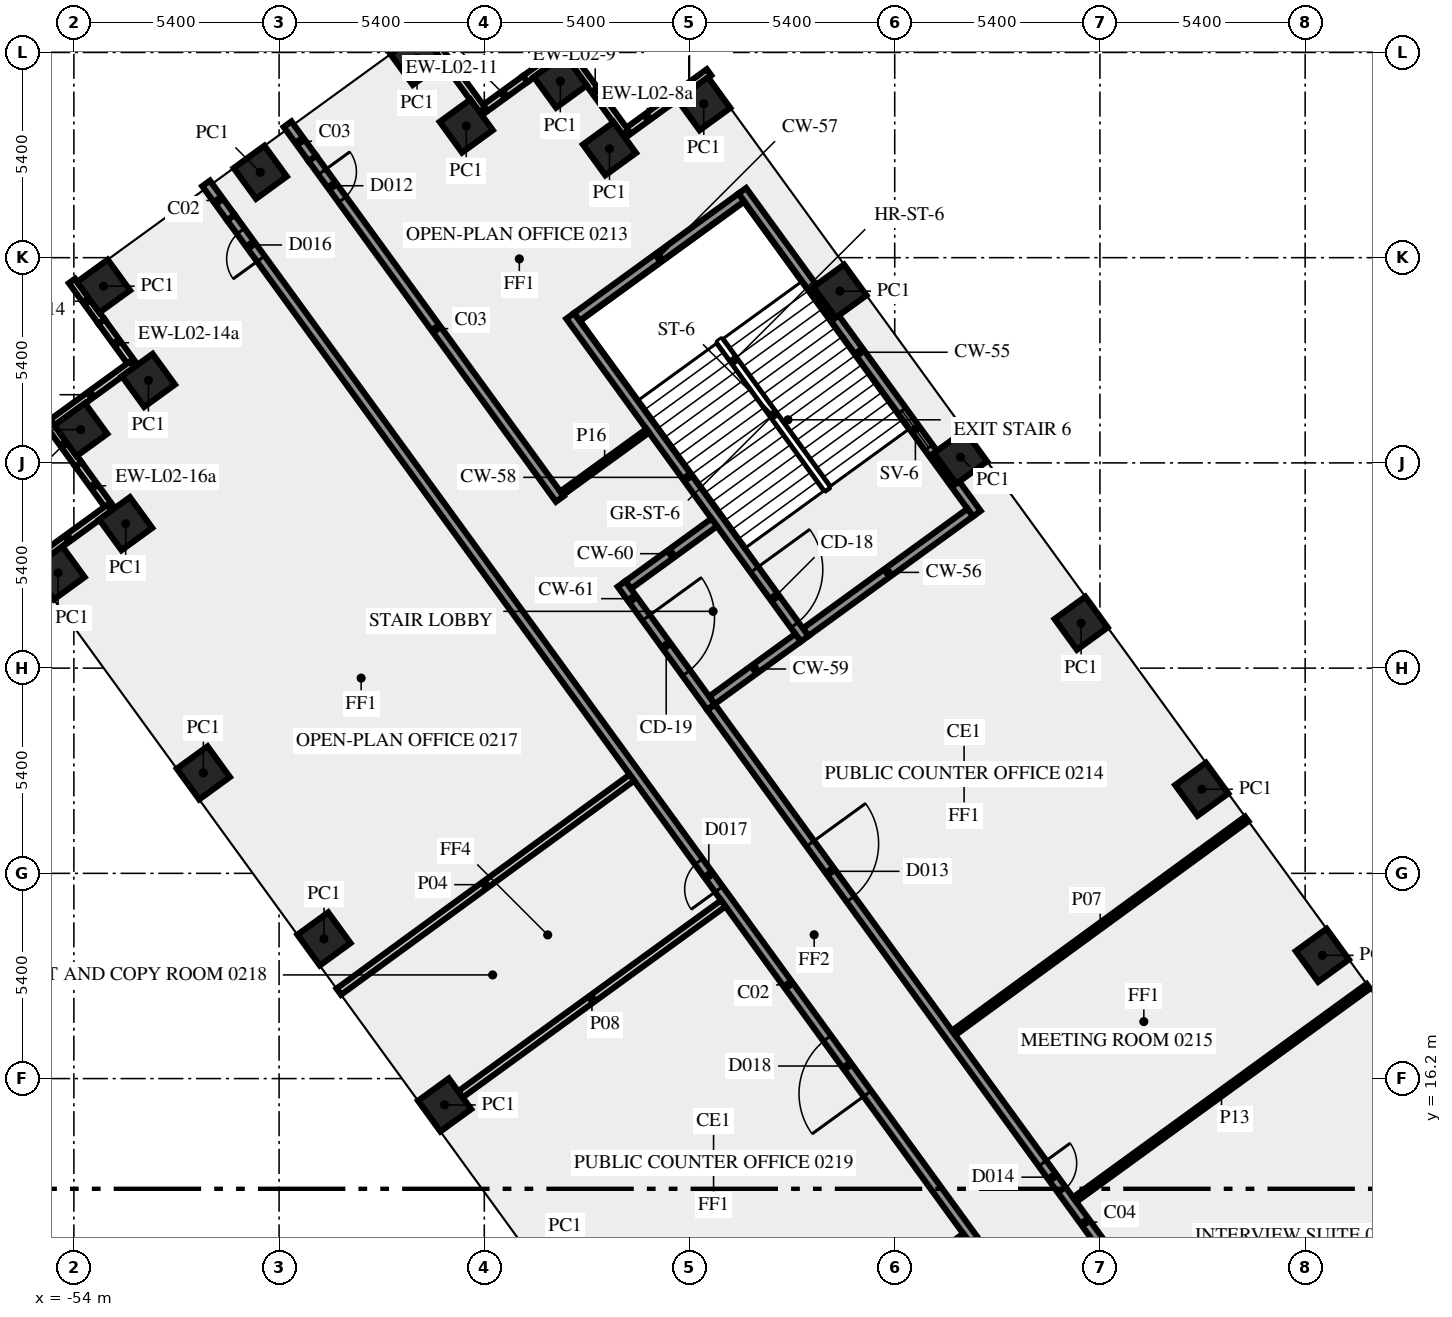
"""IFC4 building model, lengths in metres.
Left out: names, types, materials, properties, quantities, classifications, styles, units other than length and angle.
Written with IfcOpenShell. Run it as: python <this file> out.ifc"""

import sys

from ifc_helpers import new_model, si_unit, direction, frame, frame_2d, origin, origin_2d, place, context, subcontext, project, spatial, rectangle, extrude, element, fill, save


model = new_model("IFC4")
c1 = context("Model", 3, precision=1e-05, world=origin(), true_north=direction((0.0, 1.0)))
c2 = subcontext(c1, "Body", "Model", "MODEL_VIEW")
j1 = project(units=[si_unit("LENGTHUNIT", "METRE"), si_unit("PLANEANGLEUNIT", "RADIAN")], contexts=[c1])
p1 = place(None, origin())
s1 = spatial("IfcSite", under=j1, at=p1, CompositionType="ELEMENT")
p2 = place(p1, origin())
s2 = spatial("IfcBuilding", under=s1, at=p2, CompositionType="ELEMENT")
p3 = place(p2, frame((0.0, 0.0, 11.5)))
s3 = spatial("IfcBuildingStorey", under=s2, at=p3, CompositionType="ELEMENT", Elevation=11.5)
for number, where, z_axis, x_axis in (
    (1, (-21.147, 19.444, 0.0), (0.0, 0.0, 1.0), (-0.588, 0.809, 0.0)),
    (2, (-24.321, 23.812, 0.0), (0.0, 0.0, 1.0), (-0.588, 0.809, 0.0)),
    (3, (-27.495, 28.181, 0.0), (0.0, 0.0, 1.0), (-0.588, 0.809, 0.0)),
    (4, (-30.669, 32.55, 0.0), (0.0, 0.0, 1.0), (-0.588, 0.809, 0.0)),
    (5, (-33.843, 36.919, 0.0), (0.0, 0.0, 1.0), (-0.588, 0.809, 0.0)),
    (6, (-37.425, 41.85, 0.0), (0.0, 0.0, 1.0), (-0.588, 0.809, 0.0)),
    (7, (-39.906, 40.666, 0.0), (0.0, 0.0, 1.0), (-0.588, 0.809, 0.0)),
    (8, (-41.2, 42.445, 0.0), (0.0, 0.0, 1.0), (-0.588, 0.809, 0.0)),
    (9, (-43.675, 41.265, 0.0), (0.0, 0.0, 1.0), (-0.809, -0.588, 0.0)),
    (10, (-44.97, 43.045, 0.0), (0.0, 0.0, 1.0), (-0.809, -0.588, 0.0)),
    (11, (-49.096, 40.047, 0.0), (0.0, 0.0, 1.0), (-0.809, -0.588, 0.0)),
    (12, (-53.22, 37.05, 0.0), (0.0, 0.0, 1.0), (0.588, -0.809, 0.0)),
    (13, (-52.039, 34.571, 0.0), (0.0, 0.0, 1.0), (-0.809, -0.588, 0.0)),
    (14, (-53.82, 33.275, 0.0), (0.0, 0.0, 1.0), (0.588, -0.809, 0.0)),
    (15, (-52.636, 30.8, 0.0), (0.0, 0.0, 1.0), (-0.809, -0.588, 0.0)),
    (16, (-54.415, 29.505, 0.0), (0.0, 0.0, 1.0), (0.588, -0.809, 0.0)),
    (17, (-50.592, 24.243, 0.0), (0.0, 0.0, 1.0), (0.588, -0.809, 0.0)),
    (18, (-47.418, 19.875, 0.0), (0.0, 0.0, 1.0), (0.588, -0.809, 0.0)),
    (19, (-44.244, 15.506, 0.0), (0.0, 0.0, 1.0), (0.588, -0.809, 0.0)),
):
    element("IfcColumn", number, at=place(p3, frame(where, z_axis=z_axis, x_axis=x_axis)), inside=s3, PredefinedType="COLUMN", context=c2, shape_type="SweptSolid", body=[
        extrude(rectangle(XDim=1.0, YDim=1.0, at=origin_2d()), origin(), (0.0, 0.0, 1.0), 4.1),
    ])
p4 = place(p3, frame((-37.287, 42.678, 0.0), z_axis=(0.0, 0.0, 1.0), x_axis=(-0.809065186597, -0.587718915671, 0.0)))
e20 = element("IfcWall", 20, at=p4, inside=s3, PredefinedType="SOLIDWALL", context=c2, shape_type="SweptSolid", body=[
    extrude(rectangle(XDim=1.315, YDim=0.2, at=frame_2d((0.657, 0.0))), origin(), (0.0, 0.0, 1.0), 4.1),
])
p5 = place(p3, frame((-38.351, 41.905, 0.0), z_axis=(0.0, 0.0, 1.0), x_axis=(-0.809002762913, -0.58780483972, 0.0)))
e21 = element("IfcWall", 21, at=p5, inside=s3, PredefinedType="SOLIDWALL", context=c2, shape_type="SweptSolid", body=[
    extrude(rectangle(XDim=1.385, YDim=0.2, at=frame_2d((0.693, 0.0))), origin(), (0.0, 0.0, 1.0), 3.1),
])
p6 = place(p3, frame((-39.488, 41.094, 0.0), z_axis=(0.0, 0.0, 1.0), x_axis=(-0.587806000234, 0.809001919707, 0.0)))
e22 = element("IfcWall", 22, at=p6, inside=s3, PredefinedType="SOLIDWALL", context=c2, shape_type="SweptSolid", body=[
    extrude(rectangle(XDim=2.7, YDim=0.2, at=frame_2d((1.35, 0.0))), origin(), (0.0, 0.0, 1.0), 4.1),
])
p7 = place(p3, frame((-41.058, 43.275, 0.0), z_axis=(0.0, 0.0, 1.0), x_axis=(-0.809056865039, -0.587730371117, 0.0)))
e23 = element("IfcWall", 23, at=p7, inside=s3, PredefinedType="SOLIDWALL", context=c2, shape_type="SweptSolid", body=[
    extrude(rectangle(XDim=1.316, YDim=0.2, at=frame_2d((0.658, 0.0))), origin(), (0.0, 0.0, 1.0), 4.1),
])
p8 = place(p3, frame((-42.123, 42.502, 0.0), z_axis=(0.0, 0.0, 1.0), x_axis=(-0.808926734208, -0.5879094647, 0.0)))
e24 = element("IfcWall", 24, at=p8, inside=s3, PredefinedType="SOLIDWALL", context=c2, shape_type="SweptSolid", body=[
    extrude(rectangle(XDim=1.384, YDim=0.2, at=frame_2d((0.692, 0.0))), origin(), (0.0, 0.0, 1.0), 3.1),
])
p9 = place(p3, frame((-43.259, 41.691, 0.0), z_axis=(0.0, 0.0, 1.0), x_axis=(-0.587822180636, 0.808990163075, 0.0)))
e25 = element("IfcWall", 25, at=p9, inside=s3, PredefinedType="SOLIDWALL", context=c2, shape_type="SweptSolid", body=[
    extrude(rectangle(XDim=2.7, YDim=0.2, at=frame_2d((1.35, 0.0))), origin(), (0.0, 0.0, 1.0), 4.1),
])
p10 = place(p3, frame((-54.05, 37.188, 0.0), z_axis=(0.0, 0.0, 1.0), x_axis=(0.58786388341, -0.808959859686, 0.0)))
e26 = element("IfcWall", 26, at=p10, inside=s3, PredefinedType="SOLIDWALL", context=c2, shape_type="SweptSolid", body=[
    extrude(rectangle(XDim=1.321, YDim=0.2, at=frame_2d((0.66, 0.0))), origin(), (0.0, 0.0, 1.0), 4.1),
])
p11 = place(p3, frame((-53.273, 36.12, 0.0), z_axis=(0.0, 0.0, 1.0), x_axis=(0.587782252522, -0.809019173827, 0.0)))
e27 = element("IfcWall", 27, at=p11, inside=s3, PredefinedType="SOLIDWALL", context=c2, shape_type="SweptSolid", body=[
    extrude(rectangle(XDim=1.379, YDim=0.2, at=frame_2d((0.69, 0.0))), origin(), (0.0, 0.0, 1.0), 3.1),
])
p12 = place(p3, frame((-52.465, 34.987, 0.0), z_axis=(0.0, 0.0, 1.0), x_axis=(-0.809033161865, -0.587762999008, 0.0)))
e28 = element("IfcWall", 28, at=p12, inside=s3, PredefinedType="SOLIDWALL", context=c2, shape_type="SweptSolid", body=[
    extrude(rectangle(XDim=2.7, YDim=0.2, at=frame_2d((1.35, 0.0))), origin(), (0.0, 0.0, 1.0), 4.1),
])
p13 = place(p3, frame((-54.647, 33.417, 0.0), z_axis=(0.0, 0.0, 1.0), x_axis=(0.587871379726, -0.808954412127, 0.0)))
e29 = element("IfcWall", 29, at=p13, inside=s3, PredefinedType="SOLIDWALL", context=c2, shape_type="SweptSolid", body=[
    extrude(rectangle(XDim=1.305, YDim=0.2, at=frame_2d((0.653, 0.0))), origin(), (0.0, 0.0, 1.0), 4.1),
])
p14 = place(p3, frame((-53.88, 32.361, 0.0), z_axis=(0.0, 0.0, 1.0), x_axis=(0.587776137069, -0.809023616894, 0.0)))
e30 = element("IfcWall", 30, at=p14, inside=s3, PredefinedType="SOLIDWALL", context=c2, shape_type="SweptSolid", body=[
    extrude(rectangle(XDim=1.395, YDim=0.2, at=frame_2d((0.697, 0.0))), origin(), (0.0, 0.0, 1.0), 3.1),
])
p15 = place(p3, frame((-53.063, 31.216, 0.0), z_axis=(0.0, 0.0, 1.0), x_axis=(-0.809033161865, -0.587762999008, 0.0)))
e31 = element("IfcWall", 31, at=p15, inside=s3, PredefinedType="SOLIDWALL", context=c2, shape_type="SweptSolid", body=[
    extrude(rectangle(XDim=2.7, YDim=0.2, at=frame_2d((1.35, 0.0))), origin(), (0.0, 0.0, 1.0), 4.1),
])
p16 = place(p3, frame((-30.24, 31.064, 0.0), z_axis=(0.0, 0.0, 1.0), x_axis=(-0.587795589702, 0.809009483706, 0.0)))
e32 = element("IfcWall", 32, at=p16, inside=s3, PredefinedType="SHEAR", context=c2, shape_type="SweptSolid", body=[
    extrude(rectangle(XDim=10.5, YDim=0.25, at=frame_2d((5.25, 0.0))), origin(), (0.0, 0.0, 1.0), 4.1),
])
p17 = place(p16, frame((2.15, 0.0, 1.0)))
e33 = element("IfcOpeningElement", 33, at=p17, cuts=e32, PredefinedType="OPENING", context=c2, shape_type="SweptSolid", body=[
    extrude(rectangle(XDim=1.2, YDim=1.2, at=frame_2d((0.6, 0.6))), frame((0.0, 0.135, 0.0), z_axis=(0.0, -1.0, 0.0), x_axis=(1.0, 0.0, 0.0)), (0.0, 0.0, 1.0), 0.27),
])
p18 = place(p3, frame((-30.414, 31.092, 0.0), z_axis=(0.0, 0.0, 1.0), x_axis=(-0.8089984606, -0.587810760999, 0.0)))
e34 = element("IfcWall", 34, at=p18, inside=s3, PredefinedType="SHEAR", context=c2, shape_type="SweptSolid", body=[
    extrude(rectangle(XDim=5.35, YDim=0.25, at=frame_2d((2.675, 0.0))), origin(), (0.0, 0.0, 1.0), 4.1),
])
p19 = place(p3, frame((-36.439, 39.384, 0.0), z_axis=(0.0, 0.0, 1.0), x_axis=(-0.809020161303, -0.587780893365, 0.0)))
e35 = element("IfcWall", 35, at=p19, inside=s3, PredefinedType="SHEAR", context=c2, shape_type="SweptSolid", body=[
    extrude(rectangle(XDim=5.35, YDim=0.25, at=frame_2d((2.675, 0.0))), origin(), (0.0, 0.0, 1.0), 4.1),
])
p20 = place(p3, frame((-40.942, 36.267, 0.0), z_axis=(0.0, 0.0, 1.0), x_axis=(0.587795589702, -0.809009483706, 0.0)))
e36 = element("IfcWall", 36, at=p20, inside=s3, PredefinedType="SHEAR", context=c2, shape_type="SweptSolid", body=[
    extrude(rectangle(XDim=10.5, YDim=0.25, at=frame_2d((5.25, 0.0))), origin(), (0.0, 0.0, 1.0), 4.1),
])
p21 = place(p20, frame((8.25, 0.0, 0.0)))
e37 = element("IfcOpeningElement", 37, at=p21, cuts=e36, PredefinedType="OPENING", context=c2, shape_type="SweptSolid", body=[
    extrude(rectangle(XDim=1.8, YDim=2.1, at=frame_2d((0.9, 1.05))), frame((0.0, 0.135, 0.0), z_axis=(0.0, -1.0, 0.0), x_axis=(1.0, 0.0, 0.0)), (0.0, 0.0, 1.0), 0.27),
])
for number, where, z_axis, x_axis in (
    (38, (-34.945, 27.8, 0.0), (0.0, 0.0, 1.0), (-0.809, -0.588, 0.0)),
    (39, (-37.149, 30.834, 0.0), (0.0, 0.0, 1.0), (-0.809, -0.588, 0.0)),
):
    element("IfcWall", number, at=place(p3, frame(where, z_axis=z_axis, x_axis=x_axis)), inside=s3, PredefinedType="SHEAR", context=c2, shape_type="SweptSolid", body=[
        extrude(rectangle(XDim=2.8, YDim=0.25, at=frame_2d((1.4, 0.0))), origin(), (0.0, 0.0, 1.0), 4.1),
    ])
p22 = place(p3, frame((-39.589, 29.216, 0.0), z_axis=(0.0, 0.0, 1.0), x_axis=(0.587772420479, -0.809026317077, 0.0)))
e40 = element("IfcWall", 40, at=p22, inside=s3, PredefinedType="SHEAR", context=c2, shape_type="SweptSolid", body=[
    extrude(rectangle(XDim=4.0, YDim=0.25, at=frame_2d((2.0, 0.0))), origin(), (0.0, 0.0, 1.0), 4.1),
])
p23 = place(p22, frame((1.1, 0.0, 0.0)))
e41 = element("IfcOpeningElement", 41, at=p23, cuts=e40, PredefinedType="OPENING", context=c2, shape_type="SweptSolid", body=[
    extrude(rectangle(XDim=1.8, YDim=2.1, at=frame_2d((0.9, 1.05))), frame((0.0, 0.135, 0.0), z_axis=(0.0, -1.0, 0.0), x_axis=(1.0, 0.0, 0.0)), (0.0, 0.0, 1.0), 0.27),
])
p24 = place(p3, frame((-20.531, -1.523, 0.0), z_axis=(0.0, 0.0, 1.0), x_axis=(-0.587784522481, 0.809017524614, 0.0)))
e42 = element("IfcWall", 42, at=p24, inside=s3, PredefinedType="SOLIDWALL", context=c2, shape_type="SweptSolid", body=[
    extrude(rectangle(XDim=49.912, YDim=0.25, at=frame_2d((24.956, 0.0))), origin(), (0.0, 0.0, 1.0), 4.1),
])
p25 = place(p24, frame((48.57, 0.0, 0.0)))
e43 = element("IfcOpeningElement", 43, at=p25, cuts=e42, PredefinedType="OPENING", context=c2, shape_type="SweptSolid", body=[
    extrude(rectangle(XDim=0.9, YDim=2.1, at=frame_2d((0.45, 1.05))), frame((0.0, 0.135, 0.0), z_axis=(0.0, -1.0, 0.0), x_axis=(1.0, 0.0, 0.0)), (0.0, 0.0, 1.0), 0.27),
])
p26 = place(p24, frame((9.165, 0.0, 0.0)))
e44 = element("IfcOpeningElement", 44, at=p26, cuts=e42, PredefinedType="OPENING", context=c2, shape_type="SweptSolid", body=[
    extrude(rectangle(XDim=0.9, YDim=2.1, at=frame_2d((0.45, 1.05))), frame((0.0, 0.135, 0.0), z_axis=(0.0, -1.0, 0.0), x_axis=(1.0, 0.0, 0.0)), (0.0, 0.0, 1.0), 0.27),
])
p27 = place(p24, frame((21.416, 0.0, 0.0)))
e45 = element("IfcOpeningElement", 45, at=p27, cuts=e42, PredefinedType="OPENING", context=c2, shape_type="SweptSolid", body=[
    extrude(rectangle(XDim=1.8, YDim=2.1, at=frame_2d((0.9, 1.05))), frame((0.0, 0.135, 0.0), z_axis=(0.0, -1.0, 0.0), x_axis=(1.0, 0.0, 0.0)), (0.0, 0.0, 1.0), 0.27),
])
p28 = place(p24, frame((28.066, 0.0, 0.0)))
e46 = element("IfcOpeningElement", 46, at=p28, cuts=e42, PredefinedType="OPENING", context=c2, shape_type="SweptSolid", body=[
    extrude(rectangle(XDim=0.9, YDim=2.1, at=frame_2d((0.45, 1.05))), frame((0.0, 0.135, 0.0), z_axis=(0.0, -1.0, 0.0), x_axis=(1.0, 0.0, 0.0)), (0.0, 0.0, 1.0), 0.27),
])
p29 = place(p24, frame((0.533, 0.0, 0.0)))
e47 = element("IfcOpeningElement", 47, at=p29, cuts=e42, PredefinedType="OPENING", context=c2, shape_type="SweptSolid", body=[
    extrude(rectangle(XDim=0.9, YDim=2.1, at=frame_2d((0.45, 1.05))), frame((0.0, 0.135, 0.0), z_axis=(0.0, -1.0, 0.0), x_axis=(1.0, 0.0, 0.0)), (0.0, 0.0, 1.0), 0.27),
])
p30 = place(p3, frame((-47.725, 40.414, 0.0), z_axis=(0.0, 0.0, 1.0), x_axis=(0.587773291021, -0.809025684612, 0.0)))
e48 = element("IfcWall", 48, at=p30, inside=s3, PredefinedType="SOLIDWALL", context=c2, shape_type="SweptSolid", body=[
    extrude(rectangle(XDim=11.079, YDim=0.25, at=frame_2d((5.539, 0.0))), origin(), (0.0, 0.0, 1.0), 4.1),
])
p31 = place(p30, frame((0.442, 0.0, 0.0)))
e49 = element("IfcOpeningElement", 49, at=p31, cuts=e48, PredefinedType="OPENING", context=c2, shape_type="SweptSolid", body=[
    extrude(rectangle(XDim=0.9, YDim=2.1, at=frame_2d((0.45, 1.05))), frame((0.0, 0.135, 0.0), z_axis=(0.0, -1.0, 0.0), x_axis=(1.0, 0.0, 0.0)), (0.0, 0.0, 1.0), 0.27),
])
p32 = place(p3, frame((-37.232, 25.972, 0.0), z_axis=(0.0, 0.0, 1.0), x_axis=(0.587786323093, -0.809016216391, 0.0)))
e50 = element("IfcWall", 50, at=p32, inside=s3, PredefinedType="SOLIDWALL", context=c2, shape_type="SweptSolid", body=[
    extrude(rectangle(XDim=33.493, YDim=0.25, at=frame_2d((16.747, 0.0))), origin(), (0.0, 0.0, 1.0), 4.1),
])
p33 = place(p32, frame((4.438, 0.0, 0.0)))
e51 = element("IfcOpeningElement", 51, at=p33, cuts=e50, PredefinedType="OPENING", context=c2, shape_type="SweptSolid", body=[
    extrude(rectangle(XDim=1.8, YDim=2.1, at=frame_2d((0.9, 1.05))), frame((0.0, 0.135, 0.0), z_axis=(0.0, -1.0, 0.0), x_axis=(1.0, 0.0, 0.0)), (0.0, 0.0, 1.0), 0.27),
])
p34 = place(p32, frame((29.152, 0.0, 0.0)))
e52 = element("IfcOpeningElement", 52, at=p34, cuts=e50, PredefinedType="OPENING", context=c2, shape_type="SweptSolid", body=[
    extrude(rectangle(XDim=0.9, YDim=2.1, at=frame_2d((0.45, 1.05))), frame((0.0, 0.135, 0.0), z_axis=(0.0, -1.0, 0.0), x_axis=(1.0, 0.0, 0.0)), (0.0, 0.0, 1.0), 0.27),
])
p35 = place(p32, frame((14.835, 0.0, 0.0)))
e53 = element("IfcOpeningElement", 53, at=p35, cuts=e50, PredefinedType="OPENING", context=c2, shape_type="SweptSolid", body=[
    extrude(rectangle(XDim=0.9, YDim=2.1, at=frame_2d((0.45, 1.05))), frame((0.0, 0.135, 0.0), z_axis=(0.0, -1.0, 0.0), x_axis=(1.0, 0.0, 0.0)), (0.0, 0.0, 1.0), 0.27),
])
p36 = place(p3, frame((-47.028, 18.487, 0.0), z_axis=(0.0, 0.0, 1.0), x_axis=(0.807645841498, 0.589667868135, 0.0)))
e54 = element("IfcWall", 54, at=p36, inside=s3, PredefinedType="SOLIDWALL", context=c2, shape_type="SweptSolid", body=[
    extrude(rectangle(XDim=9.551, YDim=0.2, at=frame_2d((4.775, 0.0))), origin(), (0.0, 0.0, 1.0), 3.1),
])
p37 = place(p3, frame((-30.563, 12.072, 0.0), z_axis=(0.0, 0.0, 1.0), x_axis=(-0.808992136407, -0.587819464829, 0.0)))
e55 = element("IfcWall", 55, at=p37, inside=s3, PredefinedType="PARTITIONING", context=c2, shape_type="SweptSolid", body=[
    extrude(rectangle(XDim=8.45, YDim=0.12, at=frame_2d((4.225, 0.0))), origin(), (0.0, 0.0, 1.0), 4.1),
])
p38 = place(p3, frame((-30.85, 17.401, 0.0), z_axis=(0.0, 0.0, 1.0), x_axis=(0.807661302092, 0.589646691759, 0.0)))
e56 = element("IfcWall", 56, at=p38, inside=s3, PredefinedType="PARTITIONING", context=c2, shape_type="SweptSolid", body=[
    extrude(rectangle(XDim=9.55, YDim=0.15, at=frame_2d((4.775, 0.0))), origin(), (0.0, 0.0, 1.0), 3.1),
])
p39 = place(p3, frame((-36.911, 20.81, 0.0), z_axis=(0.0, 0.0, 1.0), x_axis=(-0.809000394931, -0.587808098789, 0.0)))
e57 = element("IfcWall", 57, at=p39, inside=s3, PredefinedType="SOLIDWALL", context=c2, shape_type="SweptSolid", body=[
    extrude(rectangle(XDim=8.545, YDim=0.2, at=frame_2d((4.272, 0.0))), origin(), (0.0, 0.0, 1.0), 4.1),
])
p40 = place(p3, frame((-19.938, 18.629, 0.0), z_axis=(0.0, 0.0, 1.0), x_axis=(-0.80900684162, -0.587799226107, 0.0)))
e58 = element("IfcWall", 58, at=p40, inside=s3, PredefinedType="PARTITIONING", context=c2, shape_type="SweptSolid", body=[
    extrude(rectangle(XDim=9.55, YDim=0.15, at=frame_2d((4.775, 0.0))), origin(), (0.0, 0.0, 1.0), 3.1),
])
p41 = place(p3, frame((-41.166, 31.599, 0.0), z_axis=(0.0, 0.0, 1.0), x_axis=(0.809090262332, 0.587684394381, 0.0)))
e59 = element("IfcWall", 59, at=p41, inside=s3, PredefinedType="PARTITIONING", context=c2, shape_type="SweptSolid", body=[
    extrude(rectangle(XDim=2.801, YDim=0.12, at=frame_2d((1.4, 0.0))), origin(), (0.0, 0.0, 1.0), 4.1),
])
p42 = place(p3, frame((-49.869, 38.856, 0.0), z_axis=(0.0, 0.0, 1.0), x_axis=(-0.587674273289, 0.809097613712, 0.0)))
e60 = element("IfcWall", 60, at=p42, inside=s3, PredefinedType="SOLIDWALL", context=c2, shape_type="SweptSolid", body=[
    extrude(rectangle(XDim=1.109, YDim=0.25, at=frame_2d((0.555, 0.0))), origin(), (0.0, 0.0, 1.0), 3.1),
])
p43 = place(p3, frame((-47.725, 40.414, 0.0), z_axis=(0.0, 0.0, 1.0), x_axis=(-0.587883639643, 0.808945502639, 0.0)))
e61 = element("IfcWall", 61, at=p43, inside=s3, PredefinedType="SOLIDWALL", context=c2, shape_type="SweptSolid", body=[
    extrude(rectangle(XDim=1.109, YDim=0.25, at=frame_2d((0.554, 0.0))), origin(), (0.0, 0.0, 1.0), 3.1),
])
p44 = place(p17, origin())
e62 = element("IfcWindow", 62, at=p44, inside=s3, PartitioningType="SINGLE_PANEL", PredefinedType="WINDOW", context=c2, shape_type="SweptSolid", body=[
    extrude(rectangle(XDim=1.2, YDim=1.2, at=frame_2d((0.6, 0.6))), frame((0.0, 0.03, 0.0), z_axis=(0.0, -1.0, 0.0), x_axis=(1.0, 0.0, 0.0)), (0.0, 0.0, 1.0), 0.06),
])
fill(e33, e62)
p45 = place(p21, origin())
e63 = element("IfcDoor", 63, at=p45, inside=s3, OperationType="DOUBLE_DOOR_SINGLE_SWING", PredefinedType="DOOR", context=c2, shape_type="SweptSolid", body=[
    extrude(rectangle(XDim=1.8, YDim=2.1, at=frame_2d((0.9, 1.05))), frame((0.0, 0.025, 0.0), z_axis=(0.0, -1.0, 0.0), x_axis=(1.0, 0.0, 0.0)), (0.0, 0.0, 1.0), 0.05),
])
fill(e37, e63)
p46 = place(p23, origin())
e64 = element("IfcDoor", 64, at=p46, inside=s3, OperationType="DOUBLE_DOOR_SINGLE_SWING", PredefinedType="DOOR", context=c2, shape_type="SweptSolid", body=[
    extrude(rectangle(XDim=1.8, YDim=2.1, at=frame_2d((0.9, 1.05))), frame((0.0, 0.025, 0.0), z_axis=(0.0, -1.0, 0.0), x_axis=(1.0, 0.0, 0.0)), (0.0, 0.0, 1.0), 0.05),
])
fill(e41, e64)
p47 = place(p31, origin())
e65 = element("IfcDoor", 65, at=p47, inside=s3, OperationType="SINGLE_SWING_LEFT", PredefinedType="DOOR", context=c2, shape_type="SweptSolid", body=[
    extrude(rectangle(XDim=0.9, YDim=2.1, at=frame_2d((0.45, 1.05))), frame((0.0, 0.025, 0.0), z_axis=(0.0, -1.0, 0.0), x_axis=(1.0, 0.0, 0.0)), (0.0, 0.0, 1.0), 0.05),
])
fill(e49, e65)
p48 = place(p25, origin())
e66 = element("IfcDoor", 66, at=p48, inside=s3, OperationType="SINGLE_SWING_RIGHT", PredefinedType="DOOR", context=c2, shape_type="SweptSolid", body=[
    extrude(rectangle(XDim=0.9, YDim=2.1, at=frame_2d((0.45, 1.05))), frame((0.0, 0.025, 0.0), z_axis=(0.0, -1.0, 0.0), x_axis=(1.0, 0.0, 0.0)), (0.0, 0.0, 1.0), 0.05),
])
fill(e43, e66)
p49 = place(p33, origin())
e67 = element("IfcDoor", 67, at=p49, inside=s3, OperationType="DOUBLE_DOOR_SINGLE_SWING", PredefinedType="DOOR", context=c2, shape_type="SweptSolid", body=[
    extrude(rectangle(XDim=1.8, YDim=2.1, at=frame_2d((0.9, 1.05))), frame((0.0, 0.025, 0.0), z_axis=(0.0, -1.0, 0.0), x_axis=(1.0, 0.0, 0.0)), (0.0, 0.0, 1.0), 0.05),
])
fill(e51, e67)
p50 = place(p27, origin())
e68 = element("IfcDoor", 68, at=p50, inside=s3, OperationType="DOUBLE_DOOR_SINGLE_SWING", PredefinedType="DOOR", context=c2, shape_type="SweptSolid", body=[
    extrude(rectangle(XDim=1.8, YDim=2.1, at=frame_2d((0.9, 1.05))), frame((0.0, 0.025, 0.0), z_axis=(0.0, -1.0, 0.0), x_axis=(1.0, 0.0, 0.0)), (0.0, 0.0, 1.0), 0.05),
])
fill(e45, e68)
p51 = place(p35, origin())
e69 = element("IfcDoor", 69, at=p51, inside=s3, OperationType="SINGLE_SWING_RIGHT", PredefinedType="DOOR", context=c2, shape_type="SweptSolid", body=[
    extrude(rectangle(XDim=0.9, YDim=2.1, at=frame_2d((0.45, 1.05))), frame((0.0, 0.025, 0.0), z_axis=(0.0, -1.0, 0.0), x_axis=(1.0, 0.0, 0.0)), (0.0, 0.0, 1.0), 0.05),
])
fill(e53, e69)
p52 = place(p28, origin())
e70 = element("IfcDoor", 70, at=p52, inside=s3, OperationType="SINGLE_SWING_LEFT", PredefinedType="DOOR", context=c2, shape_type="SweptSolid", body=[
    extrude(rectangle(XDim=0.9, YDim=2.1, at=frame_2d((0.45, 1.05))), frame((0.0, 0.025, 0.0), z_axis=(0.0, -1.0, 0.0), x_axis=(1.0, 0.0, 0.0)), (0.0, 0.0, 1.0), 0.05),
])
fill(e46, e70)
save(model, sys.argv[1])
